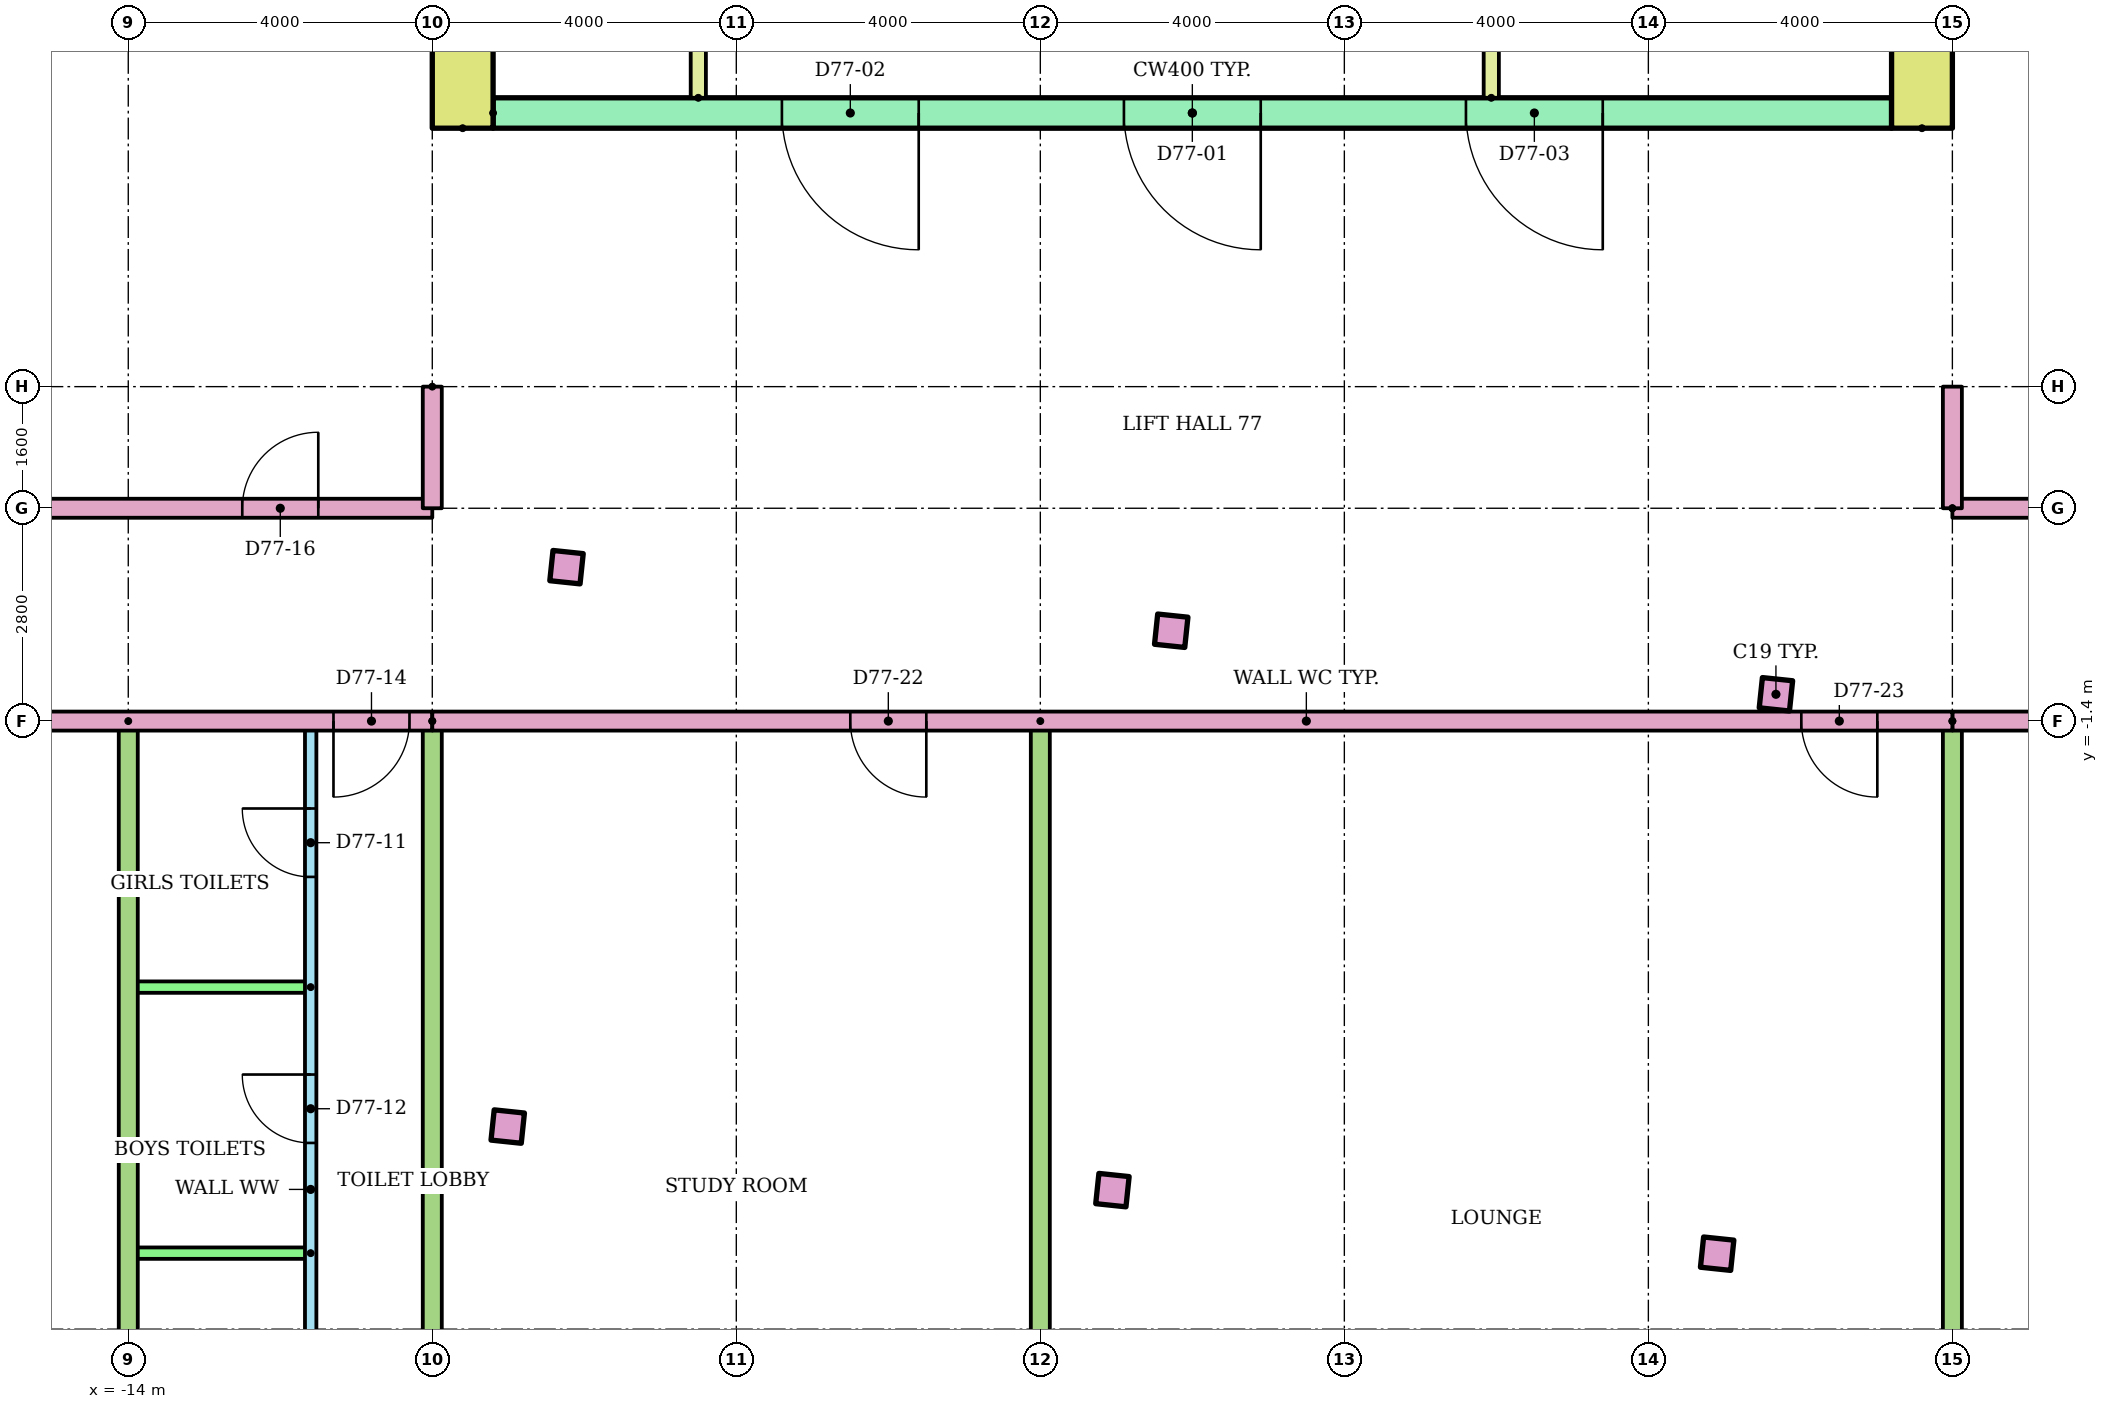
"""IFC4 building model, lengths in metres.
Left out: names, types, materials, properties, quantities, classifications, styles, units other than length and angle.
Written with IfcOpenShell. Run it as: python <this file> out.ifc"""

import sys

from ifc_helpers import new_model, si_unit, direction, frame, frame_2d, origin, origin_2d, place, context, subcontext, project, spatial, rectangle, extrude, element, fill, save


model = new_model("IFC4")
c1 = context("Model", 3, precision=1e-05, world=origin(), true_north=direction((0.0, 1.0)))
c2 = subcontext(c1, "Body", "Model", "MODEL_VIEW")
j1 = project(units=[si_unit("LENGTHUNIT", "METRE"), si_unit("PLANEANGLEUNIT", "RADIAN")], contexts=[c1])
p1 = place(None, origin())
s1 = spatial("IfcSite", under=j1, at=p1, CompositionType="ELEMENT")
p2 = place(p1, origin())
s2 = spatial("IfcBuilding", under=s1, at=p2, CompositionType="ELEMENT")
p3 = place(p2, frame((0.0, 0.0, 298.3)))
s3 = spatial("IfcBuildingStorey", under=s2, at=p3, CompositionType="ELEMENT", Elevation=298.3)
for number, where, z_axis, x_axis in (
    (1, (-9.007, -6.735, 0.0), (0.0, 0.0, 1.0), (0.995, -0.105, 0.0)),
    (2, (-1.051, -7.571, 0.0), (0.0, 0.0, 1.0), (0.995, -0.105, 0.0)),
    (3, (6.905, -8.407, 0.0), (0.0, 0.0, 1.0), (0.995, -0.105, 0.0)),
    (4, (-8.234, 0.625, 0.0), (0.0, 0.0, 1.0), (0.995, -0.105, 0.0)),
    (5, (-0.278, -0.211, 0.0), (0.0, 0.0, 1.0), (0.995, -0.105, 0.0)),
    (6, (7.678, -1.048, 0.0), (0.0, 0.0, 1.0), (0.995, -0.105, 0.0)),
):
    element("IfcColumn", number, at=place(p3, frame(where, z_axis=z_axis, x_axis=x_axis)), inside=s3, PredefinedType="COLUMN", context=c2, shape_type="SweptSolid", body=[
        extrude(rectangle(XDim=0.4, YDim=0.4, at=origin_2d()), origin(), (0.0, 0.0, 1.0), 3.4),
    ])
for number, where, z_axis, x_axis in (
    (7, (-9.6, 6.4, 0.0), (0.0, 0.0, 1.0), (0.0, 1.0, 0.0)),
    (8, (9.6, 6.4, 0.0), (0.0, 0.0, 1.0), (0.0, 1.0, 0.0)),
):
    element("IfcWall", number, at=place(p3, frame(where, z_axis=z_axis, x_axis=x_axis)), inside=s3, PredefinedType="SHEAR", context=c2, shape_type="SweptSolid", body=[
        extrude(rectangle(XDim=13.6, YDim=0.8, at=frame_2d((6.8, 0.0))), origin(), (0.0, 0.0, 1.0), 2.9),
    ])
p4 = place(p3, frame((-9.2, 6.6, 0.0)))
e9 = element("IfcWall", 9, at=p4, inside=s3, PredefinedType="SHEAR", context=c2, shape_type="SweptSolid", body=[
    extrude(rectangle(XDim=18.4, YDim=0.4, at=frame_2d((9.2, 0.0))), origin(), (0.0, 0.0, 1.0), 2.9),
])
p5 = place(p4, frame((8.3, 0.0, 0.0)))
e10 = element("IfcOpeningElement", 10, at=p5, cuts=e9, PredefinedType="OPENING", context=c2, shape_type="SweptSolid", body=[
    extrude(rectangle(XDim=1.8, YDim=2.1, at=frame_2d((0.9, 1.05))), frame((0.0, 0.21, 0.0), z_axis=(0.0, -1.0, 0.0), x_axis=(1.0, 0.0, 0.0)), (0.0, 0.0, 1.0), 0.42),
])
p6 = place(p4, frame((3.8, 0.0, 0.0)))
e11 = element("IfcOpeningElement", 11, at=p6, cuts=e9, PredefinedType="OPENING", context=c2, shape_type="SweptSolid", body=[
    extrude(rectangle(XDim=1.8, YDim=2.1, at=frame_2d((0.9, 1.05))), frame((0.0, 0.21, 0.0), z_axis=(0.0, -1.0, 0.0), x_axis=(1.0, 0.0, 0.0)), (0.0, 0.0, 1.0), 0.42),
])
p7 = place(p4, frame((12.8, 0.0, 0.0)))
e12 = element("IfcOpeningElement", 12, at=p7, cuts=e9, PredefinedType="OPENING", context=c2, shape_type="SweptSolid", body=[
    extrude(rectangle(XDim=1.8, YDim=2.1, at=frame_2d((0.9, 1.05))), frame((0.0, 0.21, 0.0), z_axis=(0.0, -1.0, 0.0), x_axis=(1.0, 0.0, 0.0)), (0.0, 0.0, 1.0), 0.42),
])
p8 = place(p3, frame((3.933, 6.8, 0.0), z_axis=(0.0, 0.0, 1.0), x_axis=(0.0, 1.0, 0.0)))
e13 = element("IfcWall", 13, at=p8, inside=s3, PredefinedType="PARTITIONING", context=c2, shape_type="SweptSolid", body=[
    extrude(rectangle(XDim=3.3, YDim=0.2, at=frame_2d((1.65, 0.0))), origin(), (0.0, 0.0, 1.0), 2.9),
])
p9 = place(p8, frame((1.1, 0.0, 0.0)))
e14 = element("IfcOpeningElement", 14, at=p9, cuts=e13, PredefinedType="OPENING", context=c2, shape_type="SweptSolid", body=[
    extrude(rectangle(XDim=1.1, YDim=2.1, at=frame_2d((0.55, 1.05))), frame((0.0, 0.11, 0.0), z_axis=(0.0, -1.0, 0.0), x_axis=(1.0, 0.0, 0.0)), (0.0, 0.0, 1.0), 0.22),
])
p10 = place(p3, frame((-6.5, 6.8, 0.0), z_axis=(0.0, 0.0, 1.0), x_axis=(0.0, 1.0, 0.0)))
e15 = element("IfcWall", 15, at=p10, inside=s3, PredefinedType="PARTITIONING", context=c2, shape_type="SweptSolid", body=[
    extrude(rectangle(XDim=3.3, YDim=0.2, at=frame_2d((1.65, 0.0))), origin(), (0.0, 0.0, 1.0), 2.9),
])
p11 = place(p10, frame((1.15, 0.0, 0.0)))
e16 = element("IfcOpeningElement", 16, at=p11, cuts=e15, PredefinedType="OPENING", context=c2, shape_type="SweptSolid", body=[
    extrude(rectangle(XDim=1.0, YDim=2.1, at=frame_2d((0.5, 1.05))), frame((0.0, 0.11, 0.0), z_axis=(0.0, -1.0, 0.0), x_axis=(1.0, 0.0, 0.0)), (0.0, 0.0, 1.0), 0.22),
])
p12 = place(p3, frame((-10.0, -1.4, 0.0), z_axis=(0.0, 0.0, 1.0), x_axis=(-1.0, 0.0, 0.0)))
e17 = element("IfcWall", 17, at=p12, inside=s3, PredefinedType="PARTITIONING", context=c2, shape_type="SweptSolid", body=[
    extrude(rectangle(XDim=12.0, YDim=0.25, at=frame_2d((6.0, 0.0))), origin(), (0.0, 0.0, 1.0), 2.6),
])
p13 = place(p12, frame((0.3, 0.0, 0.0)))
e18 = element("IfcOpeningElement", 18, at=p13, cuts=e17, PredefinedType="OPENING", context=c2, shape_type="SweptSolid", body=[
    extrude(rectangle(XDim=1.0, YDim=2.1, at=frame_2d((0.5, 1.05))), frame((0.0, 0.135, 0.0), z_axis=(0.0, -1.0, 0.0), x_axis=(1.0, 0.0, 0.0)), (0.0, 0.0, 1.0), 0.27),
])
p14 = place(p12, frame((5.5, 0.0, 0.0)))
e19 = element("IfcOpeningElement", 19, at=p14, cuts=e17, PredefinedType="OPENING", context=c2, shape_type="SweptSolid", body=[
    extrude(rectangle(XDim=1.0, YDim=2.1, at=frame_2d((0.5, 1.05))), frame((0.0, 0.135, 0.0), z_axis=(0.0, -1.0, 0.0), x_axis=(1.0, 0.0, 0.0)), (0.0, 0.0, 1.0), 0.27),
])
p15 = place(p3, frame((-11.6, -13.723, 0.0), z_axis=(0.0, 0.0, 1.0), x_axis=(0.0, 1.0, 0.0)))
e20 = element("IfcWall", 20, at=p15, inside=s3, PredefinedType="PARTITIONING", context=c2, shape_type="SweptSolid", body=[
    extrude(rectangle(XDim=12.323, YDim=0.15, at=frame_2d((6.162, 0.0))), origin(), (0.0, 0.0, 1.0), 2.6),
])
p16 = place(p15, frame((10.273, 0.0, 0.0)))
e21 = element("IfcOpeningElement", 21, at=p16, cuts=e20, PredefinedType="OPENING", context=c2, shape_type="SweptSolid", body=[
    extrude(rectangle(XDim=0.9, YDim=2.1, at=frame_2d((0.45, 1.05))), frame((0.0, 0.085, 0.0), z_axis=(0.0, -1.0, 0.0), x_axis=(1.0, 0.0, 0.0)), (0.0, 0.0, 1.0), 0.17),
])
p17 = place(p15, frame((6.773, 0.0, 0.0)))
e22 = element("IfcOpeningElement", 22, at=p17, cuts=e20, PredefinedType="OPENING", context=c2, shape_type="SweptSolid", body=[
    extrude(rectangle(XDim=0.9, YDim=2.1, at=frame_2d((0.45, 1.05))), frame((0.0, 0.085, 0.0), z_axis=(0.0, -1.0, 0.0), x_axis=(1.0, 0.0, 0.0)), (0.0, 0.0, 1.0), 0.17),
])
p18 = place(p15, frame((3.223, 0.0, 0.0)))
e23 = element("IfcOpeningElement", 23, at=p18, cuts=e20, PredefinedType="OPENING", context=c2, shape_type="SweptSolid", body=[
    extrude(rectangle(XDim=1.0, YDim=2.1, at=frame_2d((0.5, 1.05))), frame((0.0, 0.085, 0.0), z_axis=(0.0, -1.0, 0.0), x_axis=(1.0, 0.0, 0.0)), (0.0, 0.0, 1.0), 0.17),
])
for number, where, z_axis, x_axis in (
    (24, (-11.6, -4.9, 0.0), (0.0, 0.0, 1.0), (-1.0, 0.0, 0.0)),
    (25, (-11.6, -8.4, 0.0), (0.0, 0.0, 1.0), (-1.0, 0.0, 0.0)),
):
    element("IfcWall", number, at=place(p3, frame(where, z_axis=z_axis, x_axis=x_axis)), inside=s3, PredefinedType="PARTITIONING", context=c2, shape_type="SweptSolid", body=[
        extrude(rectangle(XDim=2.4, YDim=0.15, at=frame_2d((1.2, 0.0))), origin(), (0.0, 0.0, 1.0), 2.6),
    ])
p19 = place(p3, frame((-14.0, -1.4, 0.0), z_axis=(0.0, 0.0, 1.0), x_axis=(0.0, -1.0, 0.0)))
e26 = element("IfcWall", 26, at=p19, inside=s3, PredefinedType="PARTITIONING", context=c2, shape_type="SweptSolid", body=[
    extrude(rectangle(XDim=12.071, YDim=0.25, at=frame_2d((6.035, 0.0))), origin(), (0.0, 0.0, 1.0), 2.6),
])
p20 = place(p3, frame((-10.0, -1.4, 0.0), z_axis=(0.0, 0.0, 1.0), x_axis=(0.0, -1.0, 0.0)))
e27 = element("IfcWall", 27, at=p20, inside=s3, PredefinedType="PARTITIONING", context=c2, shape_type="SweptSolid", body=[
    extrude(rectangle(XDim=12.491, YDim=0.25, at=frame_2d((6.246, 0.0))), origin(), (0.0, 0.0, 1.0), 2.6),
])
p21 = place(p3, frame((-22.0, 1.4, 0.0)))
e28 = element("IfcWall", 28, at=p21, inside=s3, PredefinedType="PARTITIONING", context=c2, shape_type="SweptSolid", body=[
    extrude(rectangle(XDim=12.0, YDim=0.25, at=frame_2d((6.0, 0.0))), origin(), (0.0, 0.0, 1.0), 2.6),
])
p22 = place(p21, frame((9.5, 0.0, 0.0)))
e29 = element("IfcOpeningElement", 29, at=p22, cuts=e28, PredefinedType="OPENING", context=c2, shape_type="SweptSolid", body=[
    extrude(rectangle(XDim=1.0, YDim=2.1, at=frame_2d((0.5, 1.05))), frame((0.0, 0.135, 0.0), z_axis=(0.0, -1.0, 0.0), x_axis=(1.0, 0.0, 0.0)), (0.0, 0.0, 1.0), 0.27),
])
p23 = place(p3, frame((25.0, -1.4, 0.0), z_axis=(0.0, 0.0, 1.0), x_axis=(-1.0, 0.0, 0.0)))
e30 = element("IfcWall", 30, at=p23, inside=s3, PredefinedType="PARTITIONING", context=c2, shape_type="SweptSolid", body=[
    extrude(rectangle(XDim=15.0, YDim=0.25, at=frame_2d((7.5, 0.0))), origin(), (0.0, 0.0, 1.0), 2.6),
])
p24 = place(p23, frame((12.5, 0.0, 0.0)))
e31 = element("IfcOpeningElement", 31, at=p24, cuts=e30, PredefinedType="OPENING", context=c2, shape_type="SweptSolid", body=[
    extrude(rectangle(XDim=1.0, YDim=2.1, at=frame_2d((0.5, 1.05))), frame((0.0, 0.135, 0.0), z_axis=(0.0, -1.0, 0.0), x_axis=(1.0, 0.0, 0.0)), (0.0, 0.0, 1.0), 0.27),
])
p25 = place(p23, frame((1.743, 0.0, 0.0)))
e32 = element("IfcOpeningElement", 32, at=p25, cuts=e30, PredefinedType="OPENING", context=c2, shape_type="SweptSolid", body=[
    extrude(rectangle(XDim=1.0, YDim=2.1, at=frame_2d((0.5, 1.05))), frame((0.0, 0.135, 0.0), z_axis=(0.0, -1.0, 0.0), x_axis=(1.0, 0.0, 0.0)), (0.0, 0.0, 1.0), 0.27),
])
p26 = place(p3, frame((10.0, -1.4, 0.0), z_axis=(0.0, 0.0, 1.0), x_axis=(0.0, -1.0, 0.0)))
e33 = element("IfcWall", 33, at=p26, inside=s3, PredefinedType="PARTITIONING", context=c2, shape_type="SweptSolid", body=[
    extrude(rectangle(XDim=14.593, YDim=0.25, at=frame_2d((7.297, 0.0))), origin(), (0.0, 0.0, 1.0), 2.6),
])
p27 = place(p3, frame((10.0, 1.4, 0.0)))
e34 = element("IfcWall", 34, at=p27, inside=s3, PredefinedType="PARTITIONING", context=c2, shape_type="SweptSolid", body=[
    extrude(rectangle(XDim=15.0, YDim=0.25, at=frame_2d((7.5, 0.0))), origin(), (0.0, 0.0, 1.0), 2.6),
])
p28 = place(p27, frame((1.5, 0.0, 0.0)))
e35 = element("IfcOpeningElement", 35, at=p28, cuts=e34, PredefinedType="OPENING", context=c2, shape_type="SweptSolid", body=[
    extrude(rectangle(XDim=1.0, YDim=2.1, at=frame_2d((0.5, 1.05))), frame((0.0, 0.135, 0.0), z_axis=(0.0, -1.0, 0.0), x_axis=(1.0, 0.0, 0.0)), (0.0, 0.0, 1.0), 0.27),
])
p29 = place(p27, frame((12.675, 0.0, 0.0)))
e36 = element("IfcOpeningElement", 36, at=p29, cuts=e34, PredefinedType="OPENING", context=c2, shape_type="SweptSolid", body=[
    extrude(rectangle(XDim=1.0, YDim=2.1, at=frame_2d((0.5, 1.05))), frame((0.0, 0.135, 0.0), z_axis=(0.0, -1.0, 0.0), x_axis=(1.0, 0.0, 0.0)), (0.0, 0.0, 1.0), 0.27),
])
p30 = place(p3, frame((-2.0, -1.4, 0.0), z_axis=(0.0, 0.0, 1.0), x_axis=(0.0, -1.0, 0.0)))
e37 = element("IfcWall", 37, at=p30, inside=s3, PredefinedType="PARTITIONING", context=c2, shape_type="SweptSolid", body=[
    extrude(rectangle(XDim=13.332, YDim=0.25, at=frame_2d((6.666, 0.0))), origin(), (0.0, 0.0, 1.0), 2.6),
])
p31 = place(p3, frame((10.0, -1.4, 0.0), z_axis=(0.0, 0.0, 1.0), x_axis=(-1.0, 0.0, 0.0)))
e38 = element("IfcWall", 38, at=p31, inside=s3, PredefinedType="PARTITIONING", context=c2, shape_type="SweptSolid", body=[
    extrude(rectangle(XDim=20.0, YDim=0.25, at=frame_2d((10.0, 0.0))), origin(), (0.0, 0.0, 1.0), 2.6),
])
p32 = place(p31, frame((13.5, 0.0, 0.0)))
e39 = element("IfcOpeningElement", 39, at=p32, cuts=e38, PredefinedType="OPENING", context=c2, shape_type="SweptSolid", body=[
    extrude(rectangle(XDim=1.0, YDim=2.1, at=frame_2d((0.5, 1.05))), frame((0.0, 0.135, 0.0), z_axis=(0.0, -1.0, 0.0), x_axis=(1.0, 0.0, 0.0)), (0.0, 0.0, 1.0), 0.27),
])
p33 = place(p31, frame((0.988, 0.0, 0.0)))
e40 = element("IfcOpeningElement", 40, at=p33, cuts=e38, PredefinedType="OPENING", context=c2, shape_type="SweptSolid", body=[
    extrude(rectangle(XDim=1.0, YDim=2.1, at=frame_2d((0.5, 1.05))), frame((0.0, 0.135, 0.0), z_axis=(0.0, -1.0, 0.0), x_axis=(1.0, 0.0, 0.0)), (0.0, 0.0, 1.0), 0.27),
])
for number, where, z_axis, x_axis in (
    (41, (-10.0, 3.0, 0.0), (0.0, 0.0, 1.0), (0.0, -1.0, 0.0)),
    (42, (10.0, 1.4, 0.0), (0.0, 0.0, 1.0), (0.0, 1.0, 0.0)),
):
    element("IfcWall", number, at=place(p3, frame(where, z_axis=z_axis, x_axis=x_axis)), inside=s3, PredefinedType="PARTITIONING", context=c2, shape_type="SweptSolid", body=[
        extrude(rectangle(XDim=1.6, YDim=0.25, at=frame_2d((0.8, 0.0))), origin(), (0.0, 0.0, 1.0), 2.6),
    ])
p34 = place(p5, frame((1.8, 0.0, 0.0), z_axis=(0.0, 0.0, 1.0), x_axis=(-1.0, 0.0, 0.0)))
e43 = element("IfcDoor", 43, at=p34, inside=s3, OperationType="DOUBLE_DOOR_SINGLE_SWING", PredefinedType="DOOR", context=c2, shape_type="SweptSolid", body=[
    extrude(rectangle(XDim=1.8, YDim=2.1, at=frame_2d((0.9, 1.05))), frame((0.0, 0.025, 0.0), z_axis=(0.0, -1.0, 0.0), x_axis=(1.0, 0.0, 0.0)), (0.0, 0.0, 1.0), 0.05),
])
fill(e10, e43)
p35 = place(p6, frame((1.8, 0.0, 0.0), z_axis=(0.0, 0.0, 1.0), x_axis=(-1.0, 0.0, 0.0)))
e44 = element("IfcDoor", 44, at=p35, inside=s3, OperationType="DOUBLE_DOOR_SINGLE_SWING", PredefinedType="DOOR", context=c2, shape_type="SweptSolid", body=[
    extrude(rectangle(XDim=1.8, YDim=2.1, at=frame_2d((0.9, 1.05))), frame((0.0, 0.025, 0.0), z_axis=(0.0, -1.0, 0.0), x_axis=(1.0, 0.0, 0.0)), (0.0, 0.0, 1.0), 0.05),
])
fill(e11, e44)
p36 = place(p7, frame((1.8, 0.0, 0.0), z_axis=(0.0, 0.0, 1.0), x_axis=(-1.0, 0.0, 0.0)))
e45 = element("IfcDoor", 45, at=p36, inside=s3, OperationType="DOUBLE_DOOR_SINGLE_SWING", PredefinedType="DOOR", context=c2, shape_type="SweptSolid", body=[
    extrude(rectangle(XDim=1.8, YDim=2.1, at=frame_2d((0.9, 1.05))), frame((0.0, 0.025, 0.0), z_axis=(0.0, -1.0, 0.0), x_axis=(1.0, 0.0, 0.0)), (0.0, 0.0, 1.0), 0.05),
])
fill(e12, e45)
p37 = place(p16, origin())
e46 = element("IfcDoor", 46, at=p37, inside=s3, OperationType="SINGLE_SWING_RIGHT", PredefinedType="DOOR", context=c2, shape_type="SweptSolid", body=[
    extrude(rectangle(XDim=0.9, YDim=2.1, at=frame_2d((0.45, 1.05))), frame((0.0, 0.025, 0.0), z_axis=(0.0, -1.0, 0.0), x_axis=(1.0, 0.0, 0.0)), (0.0, 0.0, 1.0), 0.05),
])
fill(e21, e46)
p38 = place(p17, origin())
e47 = element("IfcDoor", 47, at=p38, inside=s3, OperationType="SINGLE_SWING_RIGHT", PredefinedType="DOOR", context=c2, shape_type="SweptSolid", body=[
    extrude(rectangle(XDim=0.9, YDim=2.1, at=frame_2d((0.45, 1.05))), frame((0.0, 0.025, 0.0), z_axis=(0.0, -1.0, 0.0), x_axis=(1.0, 0.0, 0.0)), (0.0, 0.0, 1.0), 0.05),
])
fill(e22, e47)
p39 = place(p13, origin())
e48 = element("IfcDoor", 48, at=p39, inside=s3, OperationType="SINGLE_SWING_RIGHT", PredefinedType="DOOR", context=c2, shape_type="SweptSolid", body=[
    extrude(rectangle(XDim=1.0, YDim=2.1, at=frame_2d((0.5, 1.05))), frame((0.0, 0.025, 0.0), z_axis=(0.0, -1.0, 0.0), x_axis=(1.0, 0.0, 0.0)), (0.0, 0.0, 1.0), 0.05),
])
fill(e18, e48)
p40 = place(p22, origin())
e49 = element("IfcDoor", 49, at=p40, inside=s3, OperationType="SINGLE_SWING_RIGHT", PredefinedType="DOOR", context=c2, shape_type="SweptSolid", body=[
    extrude(rectangle(XDim=1.0, YDim=2.1, at=frame_2d((0.5, 1.05))), frame((0.0, 0.025, 0.0), z_axis=(0.0, -1.0, 0.0), x_axis=(1.0, 0.0, 0.0)), (0.0, 0.0, 1.0), 0.05),
])
fill(e29, e49)
p41 = place(p32, origin())
e50 = element("IfcDoor", 50, at=p41, inside=s3, OperationType="SINGLE_SWING_LEFT", PredefinedType="DOOR", context=c2, shape_type="SweptSolid", body=[
    extrude(rectangle(XDim=1.0, YDim=2.1, at=frame_2d((0.5, 1.05))), frame((0.0, 0.025, 0.0), z_axis=(0.0, -1.0, 0.0), x_axis=(1.0, 0.0, 0.0)), (0.0, 0.0, 1.0), 0.05),
])
fill(e39, e50)
p42 = place(p33, origin())
e51 = element("IfcDoor", 51, at=p42, inside=s3, OperationType="SINGLE_SWING_LEFT", PredefinedType="DOOR", context=c2, shape_type="SweptSolid", body=[
    extrude(rectangle(XDim=1.0, YDim=2.1, at=frame_2d((0.5, 1.05))), frame((0.0, 0.025, 0.0), z_axis=(0.0, -1.0, 0.0), x_axis=(1.0, 0.0, 0.0)), (0.0, 0.0, 1.0), 0.05),
])
fill(e40, e51)
save(model, sys.argv[1])
